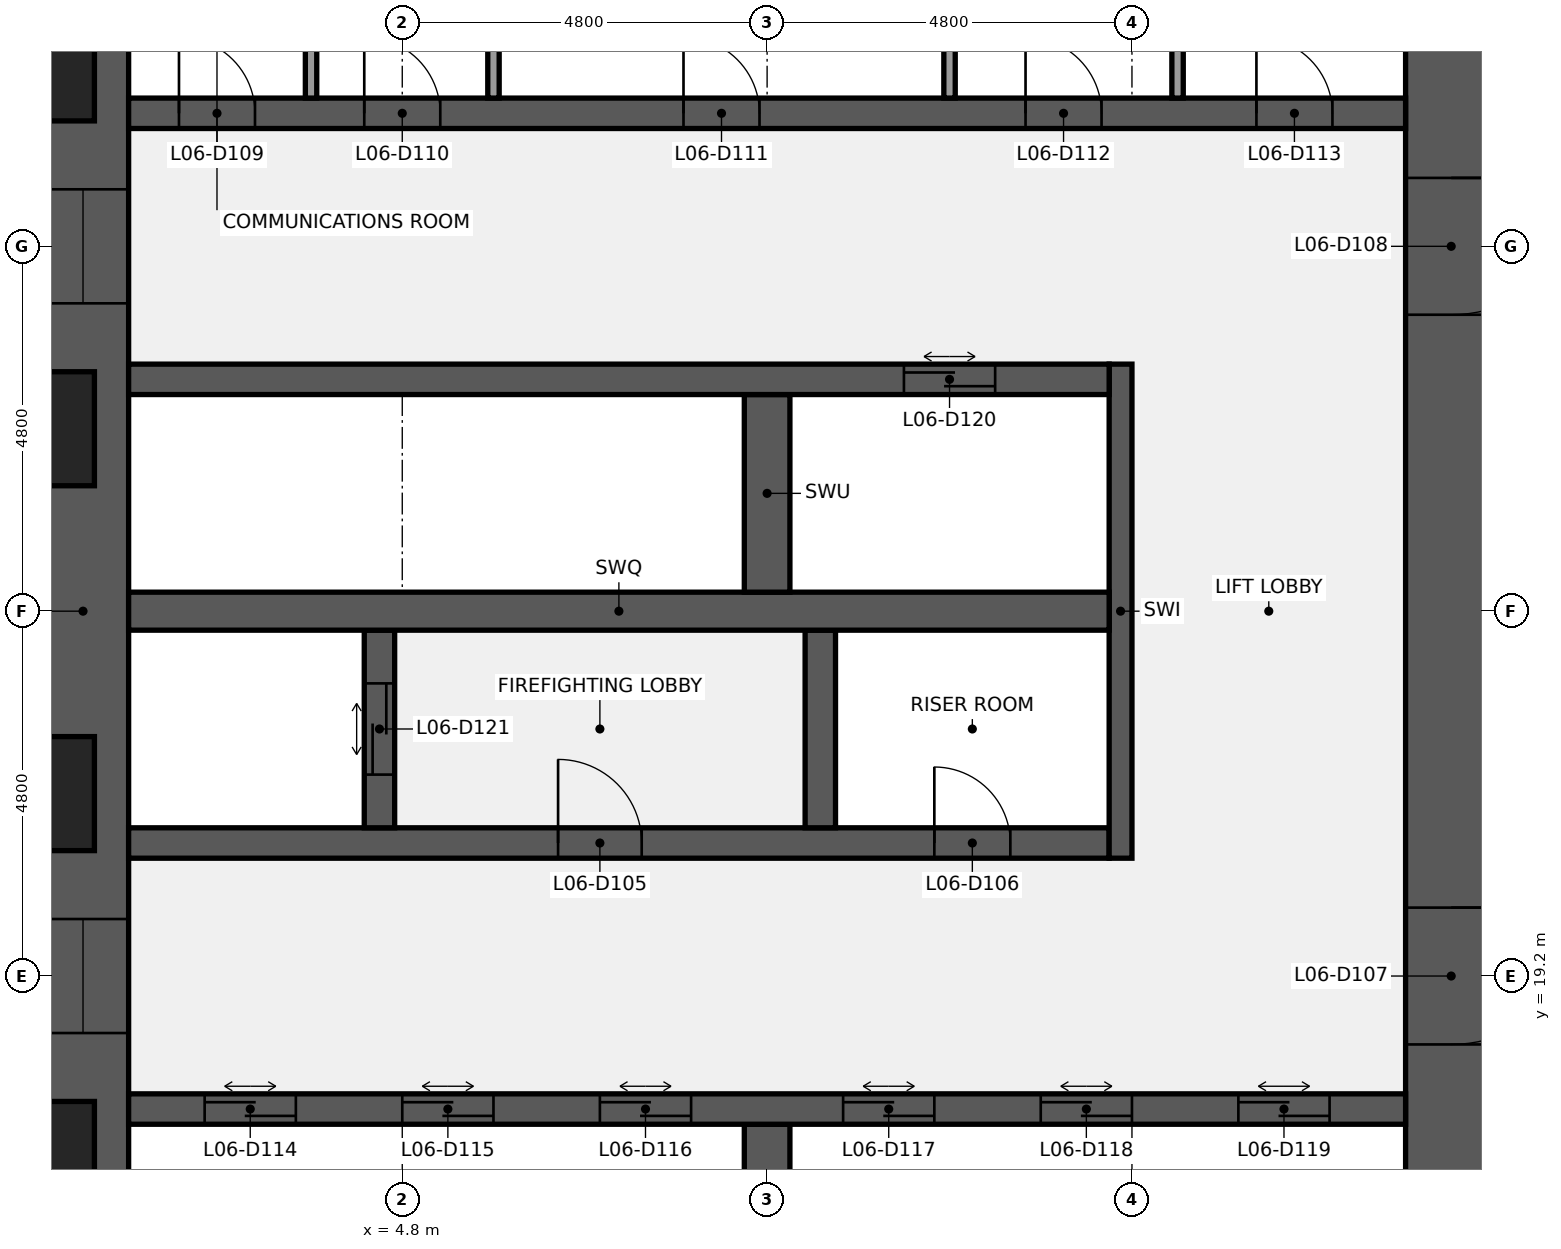
"""IFC4 building model, lengths in metres.
Left out: names, types, materials, properties, quantities, classifications, styles, units other than length and angle.
Written with IfcOpenShell. Run it as: python <this file> out.ifc"""

import sys

from ifc_helpers import new_model, si_unit, direction, frame, frame_2d, origin, place, context, subcontext, project, spatial, rectangle, extrude, element, fill, save


model = new_model("IFC4")
c1 = context("Model", 3, precision=1e-05, world=origin(), true_north=direction((0.0, 1.0)))
c2 = subcontext(c1, "Body", "Model", "MODEL_VIEW")
j1 = project(units=[si_unit("LENGTHUNIT", "METRE"), si_unit("PLANEANGLEUNIT", "RADIAN")], contexts=[c1])
p1 = place(None, origin())
s1 = spatial("IfcSite", under=j1, at=p1, CompositionType="ELEMENT")
p2 = place(p1, origin())
s2 = spatial("IfcBuilding", under=s1, at=p2, CompositionType="ELEMENT")
p3 = place(p2, frame((0.0, 0.0, 34.6)))
s3 = spatial("IfcBuildingStorey", under=s2, at=p3, CompositionType="ELEMENT", Elevation=34.6)
p4 = place(p3, frame((0.6, 9.6, 0.0), z_axis=(0.0, 0.0, 1.0), x_axis=(0.0, 1.0, 0.0)))
e1 = element("IfcWall", 1, at=p4, inside=s3, PredefinedType="SHEAR", context=c2, shape_type="SweptSolid", body=[
    extrude(rectangle(XDim=28.8, YDim=1.2, at=frame_2d((14.4, 0.0))), origin(), (0.0, 0.0, 1.0), 4.24),
])
p5 = place(p4, frame((8.85, 0.0, 0.9)))
e2 = element("IfcOpeningElement", 2, at=p5, cuts=e1, PredefinedType="OPENING", context=c2, shape_type="SweptSolid", body=[
    extrude(rectangle(XDim=1.5, YDim=1.5, at=frame_2d((0.75, 0.75))), frame((0.0, 0.61, 0.0), z_axis=(0.0, -1.0, 0.0), x_axis=(1.0, 0.0, 0.0)), (0.0, 0.0, 1.0), 1.22),
])
p6 = place(p4, frame((18.45, 0.0, 0.9)))
e3 = element("IfcOpeningElement", 3, at=p6, cuts=e1, PredefinedType="OPENING", context=c2, shape_type="SweptSolid", body=[
    extrude(rectangle(XDim=1.5, YDim=1.5, at=frame_2d((0.75, 0.75))), frame((0.0, 0.61, 0.0), z_axis=(0.0, -1.0, 0.0), x_axis=(1.0, 0.0, 0.0)), (0.0, 0.0, 1.0), 1.22),
])
p7 = place(p3, frame((18.6, 38.4, 0.0), z_axis=(0.0, 0.0, 1.0), x_axis=(0.0, -1.0, 0.0)))
e4 = element("IfcWall", 4, at=p7, inside=s3, PredefinedType="SHEAR", context=c2, shape_type="SweptSolid", body=[
    extrude(rectangle(XDim=28.8, YDim=1.2, at=frame_2d((14.4, 0.0))), origin(), (0.0, 0.0, 1.0), 4.24),
])
p8 = place(p7, frame((18.3, 0.0, 0.0)))
e5 = element("IfcOpeningElement", 5, at=p8, cuts=e4, PredefinedType="OPENING", context=c2, shape_type="SweptSolid", body=[
    extrude(rectangle(XDim=1.8, YDim=2.1, at=frame_2d((0.9, 1.05))), frame((0.0, 0.61, 0.0), z_axis=(0.0, -1.0, 0.0), x_axis=(1.0, 0.0, 0.0)), (0.0, 0.0, 1.0), 1.22),
])
p9 = place(p7, frame((8.7, 0.0, 0.0)))
e6 = element("IfcOpeningElement", 6, at=p9, cuts=e4, PredefinedType="OPENING", context=c2, shape_type="SweptSolid", body=[
    extrude(rectangle(XDim=1.8, YDim=2.1, at=frame_2d((0.9, 1.05))), frame((0.0, 0.61, 0.0), z_axis=(0.0, -1.0, 0.0), x_axis=(1.0, 0.0, 0.0)), (0.0, 0.0, 1.0), 1.22),
])
p10 = place(p3, frame((9.6, 14.65, 0.0), z_axis=(0.0, 0.0, 1.0), x_axis=(0.0, 1.0, 0.0)))
e7 = element("IfcWall", 7, at=p10, inside=s3, PredefinedType="SHEAR", context=c2, shape_type="SweptSolid", body=[
    extrude(rectangle(XDim=2.6, YDim=0.6, at=frame_2d((1.3, 0.0))), origin(), (0.0, 0.0, 1.0), 4.24),
])
p11 = place(p3, frame((1.2, 17.45, 0.0), z_axis=(0.0, 0.0, 1.0), x_axis=(1.0, 0.0, 0.0)))
e8 = element("IfcWall", 8, at=p11, inside=s3, PredefinedType="SHEAR", context=c2, shape_type="SweptSolid", body=[
    extrude(rectangle(XDim=16.8, YDim=0.4, at=frame_2d((8.4, 0.0))), origin(), (0.0, 0.0, 1.0), 4.24),
])
p12 = place(p11, frame((1.0, 0.0, 0.0)))
e9 = element("IfcOpeningElement", 9, at=p12, cuts=e8, PredefinedType="OPENING", context=c2, shape_type="SweptSolid", body=[
    extrude(rectangle(XDim=1.2, YDim=2.1, at=frame_2d((0.6, 1.05))), frame((0.0, 0.21, 0.0), z_axis=(0.0, -1.0, 0.0), x_axis=(1.0, 0.0, 0.0)), (0.0, 0.0, 1.0), 0.42),
])
p13 = place(p11, frame((3.6, 0.0, 0.0)))
e10 = element("IfcOpeningElement", 10, at=p13, cuts=e8, PredefinedType="OPENING", context=c2, shape_type="SweptSolid", body=[
    extrude(rectangle(XDim=1.2, YDim=2.1, at=frame_2d((0.6, 1.05))), frame((0.0, 0.21, 0.0), z_axis=(0.0, -1.0, 0.0), x_axis=(1.0, 0.0, 0.0)), (0.0, 0.0, 1.0), 0.42),
])
p14 = place(p11, frame((6.2, 0.0, 0.0)))
e11 = element("IfcOpeningElement", 11, at=p14, cuts=e8, PredefinedType="OPENING", context=c2, shape_type="SweptSolid", body=[
    extrude(rectangle(XDim=1.2, YDim=2.1, at=frame_2d((0.6, 1.05))), frame((0.0, 0.21, 0.0), z_axis=(0.0, -1.0, 0.0), x_axis=(1.0, 0.0, 0.0)), (0.0, 0.0, 1.0), 0.42),
])
p15 = place(p11, frame((9.4, 0.0, 0.0)))
e12 = element("IfcOpeningElement", 12, at=p15, cuts=e8, PredefinedType="OPENING", context=c2, shape_type="SweptSolid", body=[
    extrude(rectangle(XDim=1.2, YDim=2.1, at=frame_2d((0.6, 1.05))), frame((0.0, 0.21, 0.0), z_axis=(0.0, -1.0, 0.0), x_axis=(1.0, 0.0, 0.0)), (0.0, 0.0, 1.0), 0.42),
])
p16 = place(p11, frame((12.0, 0.0, 0.0)))
e13 = element("IfcOpeningElement", 13, at=p16, cuts=e8, PredefinedType="OPENING", context=c2, shape_type="SweptSolid", body=[
    extrude(rectangle(XDim=1.2, YDim=2.1, at=frame_2d((0.6, 1.05))), frame((0.0, 0.21, 0.0), z_axis=(0.0, -1.0, 0.0), x_axis=(1.0, 0.0, 0.0)), (0.0, 0.0, 1.0), 0.42),
])
p17 = place(p11, frame((14.6, 0.0, 0.0)))
e14 = element("IfcOpeningElement", 14, at=p17, cuts=e8, PredefinedType="OPENING", context=c2, shape_type="SweptSolid", body=[
    extrude(rectangle(XDim=1.2, YDim=2.1, at=frame_2d((0.6, 1.05))), frame((0.0, 0.21, 0.0), z_axis=(0.0, -1.0, 0.0), x_axis=(1.0, 0.0, 0.0)), (0.0, 0.0, 1.0), 0.42),
])
p18 = place(p3, frame((1.2, 20.95, 0.0), z_axis=(0.0, 0.0, 1.0), x_axis=(1.0, 0.0, 0.0)))
e15 = element("IfcWall", 15, at=p18, inside=s3, PredefinedType="SHEAR", context=c2, shape_type="SweptSolid", body=[
    extrude(rectangle(XDim=12.9, YDim=0.4, at=frame_2d((6.45, 0.0))), origin(), (0.0, 0.0, 1.0), 4.24),
])
p19 = place(p18, frame((5.65, 0.0, 0.0)))
e16 = element("IfcOpeningElement", 16, at=p19, cuts=e15, PredefinedType="OPENING", context=c2, shape_type="SweptSolid", body=[
    extrude(rectangle(XDim=1.1, YDim=2.1, at=frame_2d((0.55, 1.05))), frame((0.0, 0.21, 0.0), z_axis=(0.0, -1.0, 0.0), x_axis=(1.0, 0.0, 0.0)), (0.0, 0.0, 1.0), 0.42),
])
p20 = place(p18, frame((10.6, 0.0, 0.0)))
e17 = element("IfcOpeningElement", 17, at=p20, cuts=e15, PredefinedType="OPENING", context=c2, shape_type="SweptSolid", body=[
    extrude(rectangle(XDim=1.0, YDim=2.1, at=frame_2d((0.5, 1.05))), frame((0.0, 0.21, 0.0), z_axis=(0.0, -1.0, 0.0), x_axis=(1.0, 0.0, 0.0)), (0.0, 0.0, 1.0), 0.42),
])
p21 = place(p3, frame((14.25, 20.75, 0.0), z_axis=(0.0, 0.0, 1.0), x_axis=(0.0, 1.0, 0.0)))
e18 = element("IfcWall", 18, at=p21, inside=s3, PredefinedType="SHEAR", context=c2, shape_type="SweptSolid", body=[
    extrude(rectangle(XDim=6.5, YDim=0.3, at=frame_2d((3.25, 0.0))), origin(), (0.0, 0.0, 1.0), 4.24),
])
p22 = place(p3, frame((4.5, 21.15, 0.0), z_axis=(0.0, 0.0, 1.0), x_axis=(0.0, 1.0, 0.0)))
e19 = element("IfcWall", 19, at=p22, inside=s3, PredefinedType="SHEAR", context=c2, shape_type="SweptSolid", body=[
    extrude(rectangle(XDim=2.6, YDim=0.4, at=frame_2d((1.3, 0.0))), origin(), (0.0, 0.0, 1.0), 4.24),
])
p23 = place(p22, frame((0.7, 0.0, 0.0)))
e20 = element("IfcOpeningElement", 20, at=p23, cuts=e19, PredefinedType="OPENING", context=c2, shape_type="SweptSolid", body=[
    extrude(rectangle(XDim=1.2, YDim=2.1, at=frame_2d((0.6, 1.05))), frame((0.0, 0.21, 0.0), z_axis=(0.0, -1.0, 0.0), x_axis=(1.0, 0.0, 0.0)), (0.0, 0.0, 1.0), 0.42),
])
p24 = place(p3, frame((10.3, 21.15, 0.0), z_axis=(0.0, 0.0, 1.0), x_axis=(0.0, 1.0, 0.0)))
e21 = element("IfcWall", 21, at=p24, inside=s3, PredefinedType="SHEAR", context=c2, shape_type="SweptSolid", body=[
    extrude(rectangle(XDim=2.6, YDim=0.4, at=frame_2d((1.3, 0.0))), origin(), (0.0, 0.0, 1.0), 4.24),
])
p25 = place(p3, frame((1.2, 24.0, 0.0), z_axis=(0.0, 0.0, 1.0), x_axis=(1.0, 0.0, 0.0)))
e22 = element("IfcWall", 22, at=p25, inside=s3, PredefinedType="SHEAR", context=c2, shape_type="SweptSolid", body=[
    extrude(rectangle(XDim=12.9, YDim=0.5, at=frame_2d((6.45, 0.0))), origin(), (0.0, 0.0, 1.0), 4.24),
])
p26 = place(p3, frame((9.6, 24.25, 0.0), z_axis=(0.0, 0.0, 1.0), x_axis=(0.0, 1.0, 0.0)))
e23 = element("IfcWall", 23, at=p26, inside=s3, PredefinedType="SHEAR", context=c2, shape_type="SweptSolid", body=[
    extrude(rectangle(XDim=2.6, YDim=0.6, at=frame_2d((1.3, 0.0))), origin(), (0.0, 0.0, 1.0), 4.24),
])
p27 = place(p3, frame((1.2, 27.05, 0.0), z_axis=(0.0, 0.0, 1.0), x_axis=(1.0, 0.0, 0.0)))
e24 = element("IfcWall", 24, at=p27, inside=s3, PredefinedType="SHEAR", context=c2, shape_type="SweptSolid", body=[
    extrude(rectangle(XDim=12.9, YDim=0.4, at=frame_2d((6.45, 0.0))), origin(), (0.0, 0.0, 1.0), 4.24),
])
p28 = place(p27, frame((10.2, 0.0, 0.0)))
e25 = element("IfcOpeningElement", 25, at=p28, cuts=e24, PredefinedType="OPENING", context=c2, shape_type="SweptSolid", body=[
    extrude(rectangle(XDim=1.2, YDim=2.1, at=frame_2d((0.6, 1.05))), frame((0.0, 0.21, 0.0), z_axis=(0.0, -1.0, 0.0), x_axis=(1.0, 0.0, 0.0)), (0.0, 0.0, 1.0), 0.42),
])
p29 = place(p3, frame((1.2, 30.55, 0.0), z_axis=(0.0, 0.0, 1.0), x_axis=(1.0, 0.0, 0.0)))
e26 = element("IfcWall", 26, at=p29, inside=s3, PredefinedType="SHEAR", context=c2, shape_type="SweptSolid", body=[
    extrude(rectangle(XDim=16.8, YDim=0.4, at=frame_2d((8.4, 0.0))), origin(), (0.0, 0.0, 1.0), 4.24),
])
p30 = place(p29, frame((0.663, 0.0, 0.0)))
e27 = element("IfcOpeningElement", 27, at=p30, cuts=e26, PredefinedType="OPENING", context=c2, shape_type="SweptSolid", body=[
    extrude(rectangle(XDim=1.0, YDim=2.1, at=frame_2d((0.5, 1.05))), frame((0.0, 0.21, 0.0), z_axis=(0.0, -1.0, 0.0), x_axis=(1.0, 0.0, 0.0)), (0.0, 0.0, 1.0), 0.42),
])
p31 = place(p29, frame((3.1, 0.0, 0.0)))
e28 = element("IfcOpeningElement", 28, at=p31, cuts=e26, PredefinedType="OPENING", context=c2, shape_type="SweptSolid", body=[
    extrude(rectangle(XDim=1.0, YDim=2.1, at=frame_2d((0.5, 1.05))), frame((0.0, 0.21, 0.0), z_axis=(0.0, -1.0, 0.0), x_axis=(1.0, 0.0, 0.0)), (0.0, 0.0, 1.0), 0.42),
])
p32 = place(p29, frame((7.3, 0.0, 0.0)))
e29 = element("IfcOpeningElement", 29, at=p32, cuts=e26, PredefinedType="OPENING", context=c2, shape_type="SweptSolid", body=[
    extrude(rectangle(XDim=1.0, YDim=2.1, at=frame_2d((0.5, 1.05))), frame((0.0, 0.21, 0.0), z_axis=(0.0, -1.0, 0.0), x_axis=(1.0, 0.0, 0.0)), (0.0, 0.0, 1.0), 0.42),
])
p33 = place(p29, frame((11.8, 0.0, 0.0)))
e30 = element("IfcOpeningElement", 30, at=p33, cuts=e26, PredefinedType="OPENING", context=c2, shape_type="SweptSolid", body=[
    extrude(rectangle(XDim=1.0, YDim=2.1, at=frame_2d((0.5, 1.05))), frame((0.0, 0.21, 0.0), z_axis=(0.0, -1.0, 0.0), x_axis=(1.0, 0.0, 0.0)), (0.0, 0.0, 1.0), 0.42),
])
p34 = place(p29, frame((14.837, 0.0, 0.0)))
e31 = element("IfcOpeningElement", 31, at=p34, cuts=e26, PredefinedType="OPENING", context=c2, shape_type="SweptSolid", body=[
    extrude(rectangle(XDim=1.0, YDim=2.1, at=frame_2d((0.5, 1.05))), frame((0.0, 0.21, 0.0), z_axis=(0.0, -1.0, 0.0), x_axis=(1.0, 0.0, 0.0)), (0.0, 0.0, 1.0), 0.42),
])
for number, where, z_axis, x_axis in (
    (32, (3.6, 30.75, 0.0), (0.0, 0.0, 1.0), (0.0, 1.0, 0.0)),
    (33, (6.0, 30.75, 0.0), (0.0, 0.0, 1.0), (0.0, 1.0, 0.0)),
    (34, (12.0, 30.75, 0.0), (0.0, 0.0, 1.0), (0.0, 1.0, 0.0)),
    (35, (15.0, 30.75, 0.0), (0.0, 0.0, 1.0), (0.0, 1.0, 0.0)),
):
    element("IfcWall", number, at=place(p3, frame(where, z_axis=z_axis, x_axis=x_axis)), inside=s3, PredefinedType="PARTITIONING", context=c2, shape_type="SweptSolid", body=[
        extrude(rectangle(XDim=2.6, YDim=0.15, at=frame_2d((1.3, 0.0))), origin(), (0.0, 0.0, 1.0), 4.24),
    ])
p35 = place(p19, origin())
e36 = element("IfcDoor", 36, at=p35, inside=s3, OperationType="SINGLE_SWING_LEFT", PredefinedType="DOOR", context=c2, shape_type="SweptSolid", body=[
    extrude(rectangle(XDim=1.1, YDim=2.1, at=frame_2d((0.55, 1.05))), frame((0.0, 0.025, 0.0), z_axis=(0.0, -1.0, 0.0), x_axis=(1.0, 0.0, 0.0)), (0.0, 0.0, 1.0), 0.05),
])
fill(e16, e36)
p36 = place(p20, origin())
e37 = element("IfcDoor", 37, at=p36, inside=s3, OperationType="SINGLE_SWING_LEFT", PredefinedType="DOOR", context=c2, shape_type="SweptSolid", body=[
    extrude(rectangle(XDim=1.0, YDim=2.1, at=frame_2d((0.5, 1.05))), frame((0.0, 0.025, 0.0), z_axis=(0.0, -1.0, 0.0), x_axis=(1.0, 0.0, 0.0)), (0.0, 0.0, 1.0), 0.05),
])
fill(e17, e37)
p37 = place(p8, origin())
e38 = element("IfcDoor", 38, at=p37, inside=s3, OperationType="DOUBLE_DOOR_SINGLE_SWING", PredefinedType="DOOR", context=c2, shape_type="SweptSolid", body=[
    extrude(rectangle(XDim=1.8, YDim=2.1, at=frame_2d((0.9, 1.05))), frame((0.0, 0.025, 0.0), z_axis=(0.0, -1.0, 0.0), x_axis=(1.0, 0.0, 0.0)), (0.0, 0.0, 1.0), 0.05),
])
fill(e5, e38)
p38 = place(p9, origin())
e39 = element("IfcDoor", 39, at=p38, inside=s3, OperationType="DOUBLE_DOOR_SINGLE_SWING", PredefinedType="DOOR", context=c2, shape_type="SweptSolid", body=[
    extrude(rectangle(XDim=1.8, YDim=2.1, at=frame_2d((0.9, 1.05))), frame((0.0, 0.025, 0.0), z_axis=(0.0, -1.0, 0.0), x_axis=(1.0, 0.0, 0.0)), (0.0, 0.0, 1.0), 0.05),
])
fill(e6, e39)
p39 = place(p30, origin())
e40 = element("IfcDoor", 40, at=p39, inside=s3, OperationType="SINGLE_SWING_LEFT", PredefinedType="DOOR", context=c2, shape_type="SweptSolid", body=[
    extrude(rectangle(XDim=1.0, YDim=2.1, at=frame_2d((0.5, 1.05))), frame((0.0, 0.025, 0.0), z_axis=(0.0, -1.0, 0.0), x_axis=(1.0, 0.0, 0.0)), (0.0, 0.0, 1.0), 0.05),
])
fill(e27, e40)
p40 = place(p31, origin())
e41 = element("IfcDoor", 41, at=p40, inside=s3, OperationType="SINGLE_SWING_LEFT", PredefinedType="DOOR", context=c2, shape_type="SweptSolid", body=[
    extrude(rectangle(XDim=1.0, YDim=2.1, at=frame_2d((0.5, 1.05))), frame((0.0, 0.025, 0.0), z_axis=(0.0, -1.0, 0.0), x_axis=(1.0, 0.0, 0.0)), (0.0, 0.0, 1.0), 0.05),
])
fill(e28, e41)
p41 = place(p32, origin())
e42 = element("IfcDoor", 42, at=p41, inside=s3, OperationType="SINGLE_SWING_LEFT", PredefinedType="DOOR", context=c2, shape_type="SweptSolid", body=[
    extrude(rectangle(XDim=1.0, YDim=2.1, at=frame_2d((0.5, 1.05))), frame((0.0, 0.025, 0.0), z_axis=(0.0, -1.0, 0.0), x_axis=(1.0, 0.0, 0.0)), (0.0, 0.0, 1.0), 0.05),
])
fill(e29, e42)
p42 = place(p33, origin())
e43 = element("IfcDoor", 43, at=p42, inside=s3, OperationType="SINGLE_SWING_LEFT", PredefinedType="DOOR", context=c2, shape_type="SweptSolid", body=[
    extrude(rectangle(XDim=1.0, YDim=2.1, at=frame_2d((0.5, 1.05))), frame((0.0, 0.025, 0.0), z_axis=(0.0, -1.0, 0.0), x_axis=(1.0, 0.0, 0.0)), (0.0, 0.0, 1.0), 0.05),
])
fill(e30, e43)
p43 = place(p34, origin())
e44 = element("IfcDoor", 44, at=p43, inside=s3, OperationType="SINGLE_SWING_LEFT", PredefinedType="DOOR", context=c2, shape_type="SweptSolid", body=[
    extrude(rectangle(XDim=1.0, YDim=2.1, at=frame_2d((0.5, 1.05))), frame((0.0, 0.025, 0.0), z_axis=(0.0, -1.0, 0.0), x_axis=(1.0, 0.0, 0.0)), (0.0, 0.0, 1.0), 0.05),
])
fill(e31, e44)
p44 = place(p12, origin())
e45 = element("IfcDoor", 45, at=p44, inside=s3, OperationType="DOUBLE_DOOR_SLIDING", PredefinedType="DOOR", context=c2, shape_type="SweptSolid", body=[
    extrude(rectangle(XDim=1.2, YDim=2.1, at=frame_2d((0.6, 1.05))), frame((0.0, 0.025, 0.0), z_axis=(0.0, -1.0, 0.0), x_axis=(1.0, 0.0, 0.0)), (0.0, 0.0, 1.0), 0.05),
])
fill(e9, e45)
p45 = place(p13, origin())
e46 = element("IfcDoor", 46, at=p45, inside=s3, OperationType="DOUBLE_DOOR_SLIDING", PredefinedType="DOOR", context=c2, shape_type="SweptSolid", body=[
    extrude(rectangle(XDim=1.2, YDim=2.1, at=frame_2d((0.6, 1.05))), frame((0.0, 0.025, 0.0), z_axis=(0.0, -1.0, 0.0), x_axis=(1.0, 0.0, 0.0)), (0.0, 0.0, 1.0), 0.05),
])
fill(e10, e46)
p46 = place(p14, origin())
e47 = element("IfcDoor", 47, at=p46, inside=s3, OperationType="DOUBLE_DOOR_SLIDING", PredefinedType="DOOR", context=c2, shape_type="SweptSolid", body=[
    extrude(rectangle(XDim=1.2, YDim=2.1, at=frame_2d((0.6, 1.05))), frame((0.0, 0.025, 0.0), z_axis=(0.0, -1.0, 0.0), x_axis=(1.0, 0.0, 0.0)), (0.0, 0.0, 1.0), 0.05),
])
fill(e11, e47)
p47 = place(p15, origin())
e48 = element("IfcDoor", 48, at=p47, inside=s3, OperationType="DOUBLE_DOOR_SLIDING", PredefinedType="DOOR", context=c2, shape_type="SweptSolid", body=[
    extrude(rectangle(XDim=1.2, YDim=2.1, at=frame_2d((0.6, 1.05))), frame((0.0, 0.025, 0.0), z_axis=(0.0, -1.0, 0.0), x_axis=(1.0, 0.0, 0.0)), (0.0, 0.0, 1.0), 0.05),
])
fill(e12, e48)
p48 = place(p16, origin())
e49 = element("IfcDoor", 49, at=p48, inside=s3, OperationType="DOUBLE_DOOR_SLIDING", PredefinedType="DOOR", context=c2, shape_type="SweptSolid", body=[
    extrude(rectangle(XDim=1.2, YDim=2.1, at=frame_2d((0.6, 1.05))), frame((0.0, 0.025, 0.0), z_axis=(0.0, -1.0, 0.0), x_axis=(1.0, 0.0, 0.0)), (0.0, 0.0, 1.0), 0.05),
])
fill(e13, e49)
p49 = place(p17, origin())
e50 = element("IfcDoor", 50, at=p49, inside=s3, OperationType="DOUBLE_DOOR_SLIDING", PredefinedType="DOOR", context=c2, shape_type="SweptSolid", body=[
    extrude(rectangle(XDim=1.2, YDim=2.1, at=frame_2d((0.6, 1.05))), frame((0.0, 0.025, 0.0), z_axis=(0.0, -1.0, 0.0), x_axis=(1.0, 0.0, 0.0)), (0.0, 0.0, 1.0), 0.05),
])
fill(e14, e50)
p50 = place(p28, origin())
e51 = element("IfcDoor", 51, at=p50, inside=s3, OperationType="DOUBLE_DOOR_SLIDING", PredefinedType="DOOR", context=c2, shape_type="SweptSolid", body=[
    extrude(rectangle(XDim=1.2, YDim=2.1, at=frame_2d((0.6, 1.05))), frame((0.0, 0.025, 0.0), z_axis=(0.0, -1.0, 0.0), x_axis=(1.0, 0.0, 0.0)), (0.0, 0.0, 1.0), 0.05),
])
fill(e25, e51)
p51 = place(p23, origin())
e52 = element("IfcDoor", 52, at=p51, inside=s3, OperationType="DOUBLE_DOOR_SLIDING", PredefinedType="DOOR", context=c2, shape_type="SweptSolid", body=[
    extrude(rectangle(XDim=1.2, YDim=2.1, at=frame_2d((0.6, 1.05))), frame((0.0, 0.025, 0.0), z_axis=(0.0, -1.0, 0.0), x_axis=(1.0, 0.0, 0.0)), (0.0, 0.0, 1.0), 0.05),
])
fill(e20, e52)
p52 = place(p5, origin())
e53 = element("IfcWindow", 53, at=p52, inside=s3, PartitioningType="SINGLE_PANEL", PredefinedType="WINDOW", context=c2, shape_type="SweptSolid", body=[
    extrude(rectangle(XDim=1.5, YDim=1.5, at=frame_2d((0.75, 0.75))), frame((0.0, 0.03, 0.0), z_axis=(0.0, -1.0, 0.0), x_axis=(1.0, 0.0, 0.0)), (0.0, 0.0, 1.0), 0.06),
])
fill(e2, e53)
p53 = place(p6, origin())
e54 = element("IfcWindow", 54, at=p53, inside=s3, PartitioningType="SINGLE_PANEL", PredefinedType="WINDOW", context=c2, shape_type="SweptSolid", body=[
    extrude(rectangle(XDim=1.5, YDim=1.5, at=frame_2d((0.75, 0.75))), frame((0.0, 0.03, 0.0), z_axis=(0.0, -1.0, 0.0), x_axis=(1.0, 0.0, 0.0)), (0.0, 0.0, 1.0), 0.06),
])
fill(e3, e54)
save(model, sys.argv[1])
